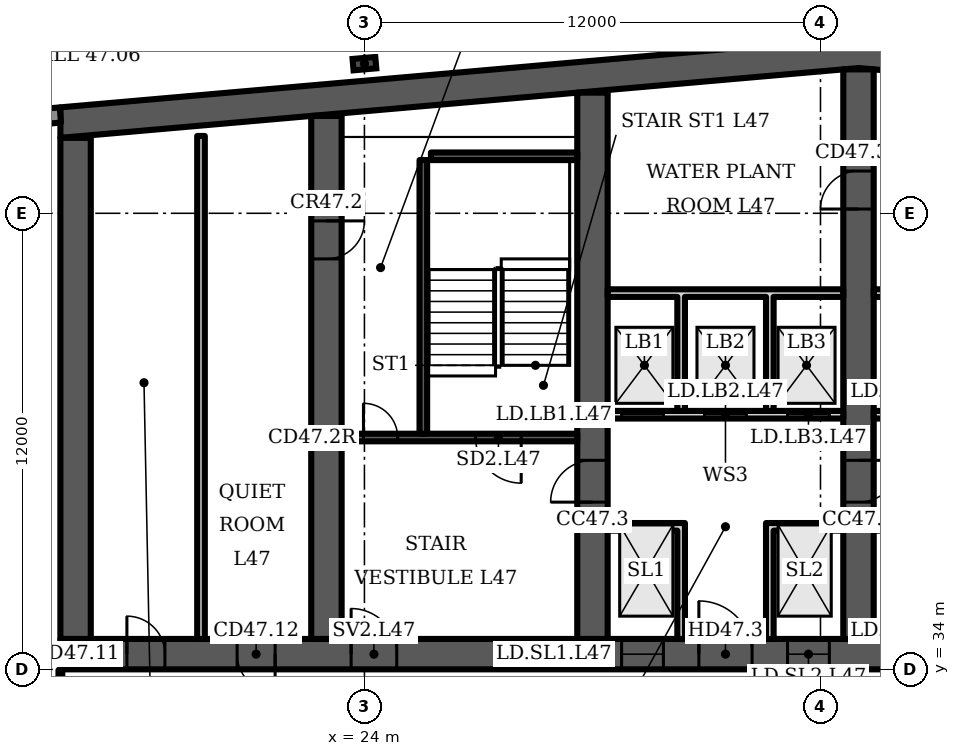
"""IFC4 building model, lengths in metres.
Left out: names, types, materials, properties, quantities, classifications, styles, units other than length and angle.
Written with IfcOpenShell. Run it as: python <this file> out.ifc"""

import sys

from ifc_helpers import new_model, si_unit, direction, frame, frame_2d, origin, origin_2d, place, context, subcontext, project, spatial, polyline, rectangle, i_section, outline, extrude, element, fill, save


model = new_model("IFC4")
c1 = context("Model", 3, precision=1e-05, world=origin(), true_north=direction((0.0, 1.0)))
c2 = subcontext(c1, "Body", "Model", "MODEL_VIEW")
j1 = project(units=[si_unit("LENGTHUNIT", "METRE"), si_unit("PLANEANGLEUNIT", "RADIAN")], contexts=[c1])
p1 = place(None, origin())
s1 = spatial("IfcSite", under=j1, at=p1, CompositionType="ELEMENT")
p2 = place(p1, origin())
s2 = spatial("IfcBuilding", under=s1, at=p2, CompositionType="ELEMENT")
p3 = place(p2, frame((0.0, 0.0, 191.5)))
s3 = spatial("IfcBuildingStorey", under=s2, at=p3, CompositionType="ELEMENT", Elevation=191.5)
p4 = place(p3, origin())
e1 = element("IfcWall", 1, at=p4, inside=s3, PredefinedType="SHEAR", context=c2, shape_type="SweptSolid", body=[
    extrude(outline(polyline([(16.0, 47.984), (37.0, 49.822), (58.0, 47.984), (58.0, 48.787), (37.0, 50.625), (16.0, 48.787), (16.0, 47.984)])), origin(), (0.0, 0.0, 1.0), 3.6),
])
p5 = place(p3, frame((16.0, 34.4, 0.0), z_axis=(0.0, 0.0, 1.0), x_axis=(1.0, 0.0, 0.0)))
e2 = element("IfcWall", 2, at=p5, inside=s3, PredefinedType="SHEAR", context=c2, shape_type="SweptSolid", body=[
    extrude(rectangle(XDim=42.0, YDim=0.8, at=frame_2d((21.0, 0.0))), origin(), (0.0, 0.0, 1.0), 3.6),
])
p6 = place(p5, frame((1.75, 0.0, 0.0)))
e3 = element("IfcOpeningElement", 3, at=p6, cuts=e2, PredefinedType="OPENING", context=c2, shape_type="SweptSolid", body=[
    extrude(rectangle(XDim=1.0, YDim=2.1, at=frame_2d((0.5, 1.05))), frame((0.0, 0.41, 0.0), z_axis=(0.0, -1.0, 0.0), x_axis=(1.0, 0.0, 0.0)), (0.0, 0.0, 1.0), 0.82),
])
p7 = place(p5, frame((4.65, 0.0, 0.0)))
e4 = element("IfcOpeningElement", 4, at=p7, cuts=e2, PredefinedType="OPENING", context=c2, shape_type="SweptSolid", body=[
    extrude(rectangle(XDim=1.0, YDim=2.1, at=frame_2d((0.5, 1.05))), frame((0.0, 0.41, 0.0), z_axis=(0.0, -1.0, 0.0), x_axis=(1.0, 0.0, 0.0)), (0.0, 0.0, 1.0), 0.82),
])
p8 = place(p5, frame((7.65, 0.0, 0.0)))
e5 = element("IfcOpeningElement", 5, at=p8, cuts=e2, PredefinedType="OPENING", context=c2, shape_type="SweptSolid", body=[
    extrude(rectangle(XDim=1.2, YDim=2.1, at=frame_2d((0.6, 1.05))), frame((0.0, 0.41, 0.0), z_axis=(0.0, -1.0, 0.0), x_axis=(1.0, 0.0, 0.0)), (0.0, 0.0, 1.0), 0.82),
])
p9 = place(p5, frame((14.767, 0.0, 0.0)))
e6 = element("IfcOpeningElement", 6, at=p9, cuts=e2, PredefinedType="OPENING", context=c2, shape_type="SweptSolid", body=[
    extrude(rectangle(XDim=1.1, YDim=2.1, at=frame_2d((0.55, 1.05))), frame((0.0, 0.41, 0.0), z_axis=(0.0, -1.0, 0.0), x_axis=(1.0, 0.0, 0.0)), (0.0, 0.0, 1.0), 0.82),
])
p10 = place(p5, frame((19.133, 0.0, 0.0)))
e7 = element("IfcOpeningElement", 7, at=p10, cuts=e2, PredefinedType="OPENING", context=c2, shape_type="SweptSolid", body=[
    extrude(rectangle(XDim=1.1, YDim=2.1, at=frame_2d((0.55, 1.05))), frame((0.0, 0.41, 0.0), z_axis=(0.0, -1.0, 0.0), x_axis=(1.0, 0.0, 0.0)), (0.0, 0.0, 1.0), 0.82),
])
p11 = place(p5, frame((16.8, 0.0, 0.0)))
e8 = element("IfcOpeningElement", 8, at=p11, cuts=e2, PredefinedType="OPENING", context=c2, shape_type="SweptSolid", body=[
    extrude(rectangle(XDim=1.4, YDim=2.1, at=frame_2d((0.7, 1.05))), frame((0.0, 0.41, 0.0), z_axis=(0.0, -1.0, 0.0), x_axis=(1.0, 0.0, 0.0)), (0.0, 0.0, 1.0), 0.82),
])
p12 = place(p5, frame((21.767, 0.0, 0.0)))
e9 = element("IfcOpeningElement", 9, at=p12, cuts=e2, PredefinedType="OPENING", context=c2, shape_type="SweptSolid", body=[
    extrude(rectangle(XDim=1.1, YDim=2.1, at=frame_2d((0.55, 1.05))), frame((0.0, 0.41, 0.0), z_axis=(0.0, -1.0, 0.0), x_axis=(1.0, 0.0, 0.0)), (0.0, 0.0, 1.0), 0.82),
])
p13 = place(p5, frame((23.95, 0.0, 0.0)))
e10 = element("IfcOpeningElement", 10, at=p13, cuts=e2, PredefinedType="OPENING", context=c2, shape_type="SweptSolid", body=[
    extrude(rectangle(XDim=1.1, YDim=2.1, at=frame_2d((0.55, 1.05))), frame((0.0, 0.41, 0.0), z_axis=(0.0, -1.0, 0.0), x_axis=(1.0, 0.0, 0.0)), (0.0, 0.0, 1.0), 0.82),
])
p14 = place(p5, frame((26.133, 0.0, 0.0)))
e11 = element("IfcOpeningElement", 11, at=p14, cuts=e2, PredefinedType="OPENING", context=c2, shape_type="SweptSolid", body=[
    extrude(rectangle(XDim=1.1, YDim=2.1, at=frame_2d((0.55, 1.05))), frame((0.0, 0.41, 0.0), z_axis=(0.0, -1.0, 0.0), x_axis=(1.0, 0.0, 0.0)), (0.0, 0.0, 1.0), 0.82),
])
p15 = place(p5, frame((33.15, 0.0, 0.0)))
e12 = element("IfcOpeningElement", 12, at=p15, cuts=e2, PredefinedType="OPENING", context=c2, shape_type="SweptSolid", body=[
    extrude(rectangle(XDim=1.2, YDim=2.1, at=frame_2d((0.6, 1.05))), frame((0.0, 0.41, 0.0), z_axis=(0.0, -1.0, 0.0), x_axis=(1.0, 0.0, 0.0)), (0.0, 0.0, 1.0), 0.82),
])
p16 = place(p5, frame((37.767, 0.0, 0.0)))
e13 = element("IfcOpeningElement", 13, at=p16, cuts=e2, PredefinedType="OPENING", context=c2, shape_type="SweptSolid", body=[
    extrude(rectangle(XDim=1.4, YDim=2.1, at=frame_2d((0.7, 1.05))), frame((0.0, 0.41, 0.0), z_axis=(0.0, -1.0, 0.0), x_axis=(1.0, 0.0, 0.0)), (0.0, 0.0, 1.0), 0.82),
])
p17 = place(p3, frame((16.4, 34.8, 0.0), z_axis=(0.0, 0.0, 1.0), x_axis=(0.0, 1.0, 0.0)))
e14 = element("IfcWall", 14, at=p17, inside=s3, PredefinedType="SHEAR", context=c2, shape_type="SweptSolid", body=[
    extrude(rectangle(XDim=13.184, YDim=0.8, at=frame_2d((6.592, 0.0))), origin(), (0.0, 0.0, 1.0), 3.6),
])
p18 = place(p3, frame((23.0, 34.8, 0.0), z_axis=(0.0, 0.0, 1.0), x_axis=(0.0, 1.0, 0.0)))
e15 = element("IfcWall", 15, at=p18, inside=s3, PredefinedType="SHEAR", context=c2, shape_type="SweptSolid", body=[
    extrude(rectangle(XDim=13.762, YDim=0.8, at=frame_2d((6.881, 0.0))), origin(), (0.0, 0.0, 1.0), 3.6),
])
p19 = place(p18, frame((10.0, 0.0, 0.0)))
e16 = element("IfcOpeningElement", 16, at=p19, cuts=e15, PredefinedType="OPENING", context=c2, shape_type="SweptSolid", body=[
    extrude(rectangle(XDim=1.0, YDim=2.1, at=frame_2d((0.5, 1.05))), frame((0.0, 0.41, 0.0), z_axis=(0.0, -1.0, 0.0), x_axis=(1.0, 0.0, 0.0)), (0.0, 0.0, 1.0), 0.82),
])
p20 = place(p3, frame((30.0, 34.8, 0.0), z_axis=(0.0, 0.0, 1.0), x_axis=(0.0, 1.0, 0.0)))
e17 = element("IfcWall", 17, at=p20, inside=s3, PredefinedType="SHEAR", context=c2, shape_type="SweptSolid", body=[
    extrude(rectangle(XDim=14.374, YDim=0.8, at=frame_2d((7.187, 0.0))), origin(), (0.0, 0.0, 1.0), 3.6),
])
p21 = place(p20, frame((3.6, 0.0, 0.0)))
e18 = element("IfcOpeningElement", 18, at=p21, cuts=e17, PredefinedType="OPENING", context=c2, shape_type="SweptSolid", body=[
    extrude(rectangle(XDim=1.1, YDim=2.1, at=frame_2d((0.55, 1.05))), frame((0.0, 0.41, 0.0), z_axis=(0.0, -1.0, 0.0), x_axis=(1.0, 0.0, 0.0)), (0.0, 0.0, 1.0), 0.82),
])
p22 = place(p3, frame((37.0, 34.8, 0.0), z_axis=(0.0, 0.0, 1.0), x_axis=(0.0, 1.0, 0.0)))
e19 = element("IfcWall", 19, at=p22, inside=s3, PredefinedType="SHEAR", context=c2, shape_type="SweptSolid", body=[
    extrude(rectangle(XDim=14.987, YDim=0.8, at=frame_2d((7.493, 0.0))), origin(), (0.0, 0.0, 1.0), 3.6),
])
p23 = place(p22, frame((11.312, 0.0, 0.0)))
e20 = element("IfcOpeningElement", 20, at=p23, cuts=e19, PredefinedType="OPENING", context=c2, shape_type="SweptSolid", body=[
    extrude(rectangle(XDim=1.0, YDim=2.1, at=frame_2d((0.5, 1.05))), frame((0.0, 0.41, 0.0), z_axis=(0.0, -1.0, 0.0), x_axis=(1.0, 0.0, 0.0)), (0.0, 0.0, 1.0), 0.82),
])
p24 = place(p22, frame((3.6, 0.0, 0.0)))
e21 = element("IfcOpeningElement", 21, at=p24, cuts=e19, PredefinedType="OPENING", context=c2, shape_type="SweptSolid", body=[
    extrude(rectangle(XDim=1.1, YDim=2.1, at=frame_2d((0.55, 1.05))), frame((0.0, 0.41, 0.0), z_axis=(0.0, -1.0, 0.0), x_axis=(1.0, 0.0, 0.0)), (0.0, 0.0, 1.0), 0.82),
])
p25 = place(p3, frame((24.0, 49.937, 0.0), z_axis=(0.0, 0.0, 1.0), x_axis=(-0.087156, 0.996198, 0.0)))
e22 = element("IfcColumn", 22, at=p25, inside=s3, PredefinedType="COLUMN", context=c2, shape_type="SweptSolid", body=[
    extrude(i_section(OverallWidth=0.3, OverallDepth=0.6, WebThickness=0.015, FlangeThickness=0.03, FilletRadius=0.027, at=origin_2d()), origin(), (0.0, 0.0, 1.0), 3.6),
])
p26 = place(p3, frame((16.0, 48.587, 0.0), z_axis=(0.0, 0.0, 1.0), x_axis=(-0.996194, -0.087168, 0.0)))
e23 = element("IfcWall", 23, at=p26, inside=s3, PredefinedType="SOLIDWALL", context=c2, shape_type="SweptSolid", body=[
    extrude(rectangle(XDim=2.994, YDim=0.4, at=frame_2d((1.497, 0.0))), origin(), (0.0, 0.0, 1.0), 3.2),
])
p27 = place(p3, frame((19.7, 34.8, 0.0), z_axis=(0.0, 0.0, 1.0), x_axis=(0.0, 1.0, 0.0)))
e24 = element("IfcWall", 24, at=p27, inside=s3, PredefinedType="PARTITIONING", context=c2, shape_type="SweptSolid", body=[
    extrude(rectangle(XDim=13.234, YDim=0.2, at=frame_2d((6.617, 0.0))), origin(), (0.0, 0.0, 1.0), 3.2),
])
p28 = place(p3, frame((23.4, 40.1, 0.0), z_axis=(0.0, 0.0, 1.0), x_axis=(1.0, 0.0, 0.0)))
e25 = element("IfcWall", 25, at=p28, inside=s3, PredefinedType="SHEAR", context=c2, shape_type="SweptSolid", body=[
    extrude(rectangle(XDim=6.2, YDim=0.2, at=frame_2d((3.1, 0.0))), origin(), (0.0, 0.0, 1.0), 3.2),
])
p29 = place(p28, frame((3.525, 0.0, 0.0)))
e26 = element("IfcOpeningElement", 26, at=p29, cuts=e25, PredefinedType="OPENING", context=c2, shape_type="SweptSolid", body=[
    extrude(rectangle(XDim=1.2, YDim=2.1, at=frame_2d((0.6, 1.05))), frame((0.0, 0.11, 0.0), z_axis=(0.0, -1.0, 0.0), x_axis=(1.0, 0.0, 0.0)), (0.0, 0.0, 1.0), 0.22),
])
p30 = place(p28, frame((0.575, 0.0, 0.0)))
e27 = element("IfcOpeningElement", 27, at=p30, cuts=e25, PredefinedType="OPENING", context=c2, shape_type="SweptSolid", body=[
    extrude(rectangle(XDim=0.9, YDim=2.1, at=frame_2d((0.45, 1.05))), frame((0.0, 0.11, 0.0), z_axis=(0.0, -1.0, 0.0), x_axis=(1.0, 0.0, 0.0)), (0.0, 0.0, 1.0), 0.22),
])
p31 = place(p3, frame((25.55, 40.2, 0.0), z_axis=(0.0, 0.0, 1.0), x_axis=(0.0, 1.0, 0.0)))
e28 = element("IfcWall", 28, at=p31, inside=s3, PredefinedType="SHEAR", context=c2, shape_type="SweptSolid", body=[
    extrude(rectangle(XDim=7.2, YDim=0.2, at=frame_2d((3.6, 0.0))), origin(), (0.0, 0.0, 1.0), 3.2),
])
p32 = place(p3, frame((25.75, 47.5, 0.0), z_axis=(0.0, 0.0, 1.0), x_axis=(1.0, 0.0, 0.0)))
e29 = element("IfcWall", 29, at=p32, inside=s3, PredefinedType="SHEAR", context=c2, shape_type="SweptSolid", body=[
    extrude(rectangle(XDim=3.85, YDim=0.2, at=frame_2d((1.925, 0.0))), origin(), (0.0, 0.0, 1.0), 3.2),
])
p33 = place(p3, frame((30.4, 40.7, 0.0), z_axis=(0.0, 0.0, 1.0), x_axis=(1.0, 0.0, 0.0)))
e30 = element("IfcWall", 30, at=p33, inside=s3, PredefinedType="PARTITIONING", context=c2, shape_type="SweptSolid", body=[
    extrude(rectangle(XDim=6.2, YDim=0.2, at=frame_2d((3.1, 0.0))), origin(), (0.0, 0.0, 1.0), 3.2),
])
p34 = place(p33, frame((0.367, 0.0, 0.0)))
e31 = element("IfcOpeningElement", 31, at=p34, cuts=e30, PredefinedType="OPENING", context=c2, shape_type="SweptSolid", body=[
    extrude(rectangle(XDim=1.1, YDim=2.1, at=frame_2d((0.55, 1.05))), frame((0.0, 0.11, 0.0), z_axis=(0.0, -1.0, 0.0), x_axis=(1.0, 0.0, 0.0)), (0.0, 0.0, 1.0), 0.22),
])
p35 = place(p33, frame((2.55, 0.0, 0.0)))
e32 = element("IfcOpeningElement", 32, at=p35, cuts=e30, PredefinedType="OPENING", context=c2, shape_type="SweptSolid", body=[
    extrude(rectangle(XDim=1.1, YDim=2.1, at=frame_2d((0.55, 1.05))), frame((0.0, 0.11, 0.0), z_axis=(0.0, -1.0, 0.0), x_axis=(1.0, 0.0, 0.0)), (0.0, 0.0, 1.0), 0.22),
])
p36 = place(p33, frame((4.733, 0.0, 0.0)))
e33 = element("IfcOpeningElement", 33, at=p36, cuts=e30, PredefinedType="OPENING", context=c2, shape_type="SweptSolid", body=[
    extrude(rectangle(XDim=1.1, YDim=2.1, at=frame_2d((0.55, 1.05))), frame((0.0, 0.11, 0.0), z_axis=(0.0, -1.0, 0.0), x_axis=(1.0, 0.0, 0.0)), (0.0, 0.0, 1.0), 0.22),
])
p37 = place(p3, frame((0.0, 0.0, -0.0)))
e34 = element("IfcWall", 34, at=p37, inside=s3, PredefinedType="PARTITIONING", context=c2, shape_type="SweptSolid", body=[
    extrude(outline(polyline([(32.233, 37.65), (30.4, 37.65), (30.4, 37.85), (32.233, 37.85), (32.433, 37.85), (32.433, 34.8), (32.233, 34.8), (32.233, 37.65)])), origin(), (0.0, 0.0, 1.0), 3.2),
])
p38 = place(p3, frame((0.0, 0.0, -0.0)))
e35 = element("IfcWall", 35, at=p38, inside=s3, PredefinedType="PARTITIONING", context=c2, shape_type="SweptSolid", body=[
    extrude(outline(polyline([(34.567, 37.85), (34.767, 37.85), (36.6, 37.85), (36.6, 37.65), (34.767, 37.65), (34.767, 34.8), (34.567, 34.8), (34.567, 37.85)])), origin(), (0.0, 0.0, 1.0), 3.2),
])
p39 = place(p3, frame((0.0, 0.0, -0.0)))
e36 = element("IfcWall", 36, at=p39, inside=s3, PredefinedType="PARTITIONING", context=c2, shape_type="SweptSolid", body=[
    extrude(outline(polyline([(32.433, 40.8), (32.233, 40.8), (32.233, 43.8), (30.4, 43.8), (30.4, 44.0), (36.6, 44.0), (36.6, 43.8), (34.767, 43.8), (34.767, 40.8), (34.567, 40.8), (34.567, 43.8), (32.433, 43.8), (32.433, 40.8)])), origin(), (0.0, 0.0, 1.0), 3.2),
])
p40 = place(p3, frame((37.4, 40.7, 0.0), z_axis=(0.0, 0.0, 1.0), x_axis=(1.0, 0.0, 0.0)))
e37 = element("IfcWall", 37, at=p40, inside=s3, PredefinedType="PARTITIONING", context=c2, shape_type="SweptSolid", body=[
    extrude(rectangle(XDim=6.2, YDim=0.2, at=frame_2d((3.1, 0.0))), origin(), (0.0, 0.0, 1.0), 3.2),
])
p41 = place(p40, frame((0.367, 0.0, 0.0)))
e38 = element("IfcOpeningElement", 38, at=p41, cuts=e37, PredefinedType="OPENING", context=c2, shape_type="SweptSolid", body=[
    extrude(rectangle(XDim=1.1, YDim=2.1, at=frame_2d((0.55, 1.05))), frame((0.0, 0.11, 0.0), z_axis=(0.0, -1.0, 0.0), x_axis=(1.0, 0.0, 0.0)), (0.0, 0.0, 1.0), 0.22),
])
p42 = place(p40, frame((2.55, 0.0, 0.0)))
e39 = element("IfcOpeningElement", 39, at=p42, cuts=e37, PredefinedType="OPENING", context=c2, shape_type="SweptSolid", body=[
    extrude(rectangle(XDim=1.1, YDim=2.1, at=frame_2d((0.55, 1.05))), frame((0.0, 0.11, 0.0), z_axis=(0.0, -1.0, 0.0), x_axis=(1.0, 0.0, 0.0)), (0.0, 0.0, 1.0), 0.22),
])
p43 = place(p40, frame((4.733, 0.0, 0.0)))
e40 = element("IfcOpeningElement", 40, at=p43, cuts=e37, PredefinedType="OPENING", context=c2, shape_type="SweptSolid", body=[
    extrude(rectangle(XDim=1.1, YDim=2.1, at=frame_2d((0.55, 1.05))), frame((0.0, 0.11, 0.0), z_axis=(0.0, -1.0, 0.0), x_axis=(1.0, 0.0, 0.0)), (0.0, 0.0, 1.0), 0.22),
])
p44 = place(p3, frame((0.0, 0.0, -0.0)))
e41 = element("IfcWall", 41, at=p44, inside=s3, PredefinedType="PARTITIONING", context=c2, shape_type="SweptSolid", body=[
    extrude(outline(polyline([(41.567, 37.1), (39.433, 37.1), (39.433, 34.8), (39.233, 34.8), (39.233, 37.65), (37.4, 37.65), (37.4, 37.85), (39.233, 37.85), (39.433, 37.85), (39.433, 37.3), (41.567, 37.3), (41.567, 37.55), (41.767, 37.55), (43.6, 37.55), (43.6, 37.35), (41.767, 37.35), (41.767, 34.8), (41.567, 34.8), (41.567, 37.1)])), origin(), (0.0, 0.0, 1.0), 3.2),
])
p45 = place(p3, frame((0.0, 0.0, -0.0)))
e42 = element("IfcWall", 42, at=p45, inside=s3, PredefinedType="PARTITIONING", context=c2, shape_type="SweptSolid", body=[
    extrude(outline(polyline([(39.433, 40.8), (39.233, 40.8), (39.233, 43.8), (37.4, 43.8), (37.4, 44.0), (43.6, 44.0), (43.6, 43.8), (41.767, 43.8), (41.767, 40.8), (41.567, 40.8), (41.567, 43.8), (39.433, 43.8), (39.433, 40.8)])), origin(), (0.0, 0.0, 1.0), 3.2),
])
p46 = place(p3, frame((37.0, 30.5, 0.0), z_axis=(0.0, 0.0, 1.0), x_axis=(0.0, 1.0, 0.0)))
e43 = element("IfcWall", 43, at=p46, inside=s3, PredefinedType="PARTITIONING", context=c2, shape_type="SweptSolid", body=[
    extrude(rectangle(XDim=3.5, YDim=0.2, at=frame_2d((1.75, 0.0))), origin(), (0.0, 0.0, 1.0), 3.2),
])
p47 = place(p46, frame((1.2, 0.0, 0.0)))
e44 = element("IfcOpeningElement", 44, at=p47, cuts=e43, PredefinedType="OPENING", context=c2, shape_type="SweptSolid", body=[
    extrude(rectangle(XDim=1.1, YDim=2.1, at=frame_2d((0.55, 1.05))), frame((0.0, 0.11, 0.0), z_axis=(0.0, -1.0, 0.0), x_axis=(1.0, 0.0, 0.0)), (0.0, 0.0, 1.0), 0.22),
])
p48 = place(p3, frame((16.0, 30.5, 0.0), z_axis=(0.0, 0.0, 1.0), x_axis=(0.0, 1.0, 0.0)))
e45 = element("IfcWall", 45, at=p48, inside=s3, PredefinedType="PARTITIONING", context=c2, shape_type="SweptSolid", body=[
    extrude(rectangle(XDim=3.48, YDim=0.1, at=frame_2d((1.74, 0.0))), origin(), (0.0, 0.0, 1.0), 3.2),
])
p49 = place(p48, frame((0.08, 0.0, 0.0)))
e46 = element("IfcOpeningElement", 46, at=p49, cuts=e45, PredefinedType="OPENING", context=c2, shape_type="SweptSolid", body=[
    extrude(rectangle(XDim=1.0, YDim=2.1, at=frame_2d((0.5, 1.05))), frame((0.0, 0.06, 0.0), z_axis=(0.0, -1.0, 0.0), x_axis=(1.0, 0.0, 0.0)), (0.0, 0.0, 1.0), 0.12),
])
p50 = place(p6, origin())
e47 = element("IfcDoor", 47, at=p50, inside=s3, OperationType="SINGLE_SWING_LEFT", PredefinedType="DOOR", context=c2, shape_type="SweptSolid", body=[
    extrude(rectangle(XDim=1.0, YDim=2.1, at=frame_2d((0.5, 1.05))), frame((0.0, 0.4, 0.0), z_axis=(0.0, -1.0, 0.0), x_axis=(1.0, 0.0, 0.0)), (0.0, 0.0, 1.0), 0.8),
])
fill(e3, e47)
p51 = place(p7, origin())
e48 = element("IfcDoor", 48, at=p51, inside=s3, OperationType="SINGLE_SWING_RIGHT", PredefinedType="DOOR", context=c2, shape_type="SweptSolid", body=[
    extrude(rectangle(XDim=1.0, YDim=2.1, at=frame_2d((0.5, 1.05))), frame((0.0, 0.4, 0.0), z_axis=(0.0, -1.0, 0.0), x_axis=(1.0, 0.0, 0.0)), (0.0, 0.0, 1.0), 0.8),
])
fill(e4, e48)
p52 = place(p29, origin())
e49 = element("IfcDoor", 49, at=p52, inside=s3, OperationType="SINGLE_SWING_RIGHT", PredefinedType="DOOR", context=c2, shape_type="SweptSolid", body=[
    extrude(rectangle(XDim=1.2, YDim=2.1, at=frame_2d((0.6, 1.05))), frame((0.0, 0.025, 0.0), z_axis=(0.0, -1.0, 0.0), x_axis=(1.0, 0.0, 0.0)), (0.0, 0.0, 1.0), 0.05),
])
fill(e26, e49)
p53 = place(p30, origin())
e50 = element("IfcDoor", 50, at=p53, inside=s3, OperationType="SINGLE_SWING_LEFT", PredefinedType="DOOR", context=c2, shape_type="SweptSolid", body=[
    extrude(rectangle(XDim=0.9, YDim=2.1, at=frame_2d((0.45, 1.05))), frame((0.0, 0.025, 0.0), z_axis=(0.0, -1.0, 0.0), x_axis=(1.0, 0.0, 0.0)), (0.0, 0.0, 1.0), 0.05),
])
fill(e27, e50)
p54 = place(p8, origin())
e51 = element("IfcDoor", 51, at=p54, inside=s3, OperationType="SINGLE_SWING_LEFT", PredefinedType="DOOR", context=c2, shape_type="SweptSolid", body=[
    extrude(rectangle(XDim=1.2, YDim=2.1, at=frame_2d((0.6, 1.05))), frame((0.0, 0.025, 0.0), z_axis=(0.0, -1.0, 0.0), x_axis=(1.0, 0.0, 0.0)), (0.0, 0.0, 1.0), 0.05),
])
fill(e5, e51)
p55 = place(p9, origin())
e52 = element("IfcDoor", 52, at=p55, inside=s3, OperationType="DOUBLE_DOOR_SLIDING", PredefinedType="DOOR", context=c2, shape_type="SweptSolid", body=[
    extrude(rectangle(XDim=1.1, YDim=2.1, at=frame_2d((0.55, 1.05))), frame((0.0, 0.025, 0.0), z_axis=(0.0, -1.0, 0.0), x_axis=(1.0, 0.0, 0.0)), (0.0, 0.0, 1.0), 0.05),
])
fill(e6, e52)
p56 = place(p10, origin())
e53 = element("IfcDoor", 53, at=p56, inside=s3, OperationType="DOUBLE_DOOR_SLIDING", PredefinedType="DOOR", context=c2, shape_type="SweptSolid", body=[
    extrude(rectangle(XDim=1.1, YDim=2.1, at=frame_2d((0.55, 1.05))), frame((0.0, 0.025, 0.0), z_axis=(0.0, -1.0, 0.0), x_axis=(1.0, 0.0, 0.0)), (0.0, 0.0, 1.0), 0.05),
])
fill(e7, e53)
p57 = place(p11, origin())
e54 = element("IfcDoor", 54, at=p57, inside=s3, OperationType="DOUBLE_DOOR_SINGLE_SWING", PredefinedType="DOOR", context=c2, shape_type="SweptSolid", body=[
    extrude(rectangle(XDim=1.4, YDim=2.1, at=frame_2d((0.7, 1.05))), frame((0.0, 0.025, 0.0), z_axis=(0.0, -1.0, 0.0), x_axis=(1.0, 0.0, 0.0)), (0.0, 0.0, 1.0), 0.05),
])
fill(e8, e54)
p58 = place(p34, origin())
e55 = element("IfcDoor", 55, at=p58, inside=s3, OperationType="DOUBLE_DOOR_SLIDING", PredefinedType="DOOR", context=c2, shape_type="SweptSolid", body=[
    extrude(rectangle(XDim=1.1, YDim=2.1, at=frame_2d((0.55, 1.05))), frame((0.0, 0.025, 0.0), z_axis=(0.0, -1.0, 0.0), x_axis=(1.0, 0.0, 0.0)), (0.0, 0.0, 1.0), 0.05),
])
fill(e31, e55)
p59 = place(p35, origin())
e56 = element("IfcDoor", 56, at=p59, inside=s3, OperationType="DOUBLE_DOOR_SLIDING", PredefinedType="DOOR", context=c2, shape_type="SweptSolid", body=[
    extrude(rectangle(XDim=1.1, YDim=2.1, at=frame_2d((0.55, 1.05))), frame((0.0, 0.025, 0.0), z_axis=(0.0, -1.0, 0.0), x_axis=(1.0, 0.0, 0.0)), (0.0, 0.0, 1.0), 0.05),
])
fill(e32, e56)
p60 = place(p36, origin())
e57 = element("IfcDoor", 57, at=p60, inside=s3, OperationType="DOUBLE_DOOR_SLIDING", PredefinedType="DOOR", context=c2, shape_type="SweptSolid", body=[
    extrude(rectangle(XDim=1.1, YDim=2.1, at=frame_2d((0.55, 1.05))), frame((0.0, 0.025, 0.0), z_axis=(0.0, -1.0, 0.0), x_axis=(1.0, 0.0, 0.0)), (0.0, 0.0, 1.0), 0.05),
])
fill(e33, e57)
p61 = place(p23, origin())
e58 = element("IfcDoor", 58, at=p61, inside=s3, OperationType="SINGLE_SWING_LEFT", PredefinedType="DOOR", context=c2, shape_type="SweptSolid", body=[
    extrude(rectangle(XDim=1.0, YDim=2.1, at=frame_2d((0.5, 1.05))), frame((0.0, 0.4, 0.0), z_axis=(0.0, -1.0, 0.0), x_axis=(1.0, 0.0, 0.0)), (0.0, 0.0, 1.0), 0.8),
])
fill(e20, e58)
p62 = place(p19, origin())
e59 = element("IfcDoor", 59, at=p62, inside=s3, OperationType="SINGLE_SWING_RIGHT", PredefinedType="DOOR", context=c2, shape_type="SweptSolid", body=[
    extrude(rectangle(XDim=1.0, YDim=2.1, at=frame_2d((0.5, 1.05))), frame((0.0, 0.4, 0.0), z_axis=(0.0, -1.0, 0.0), x_axis=(1.0, 0.0, 0.0)), (0.0, 0.0, 1.0), 0.8),
])
fill(e16, e59)
p63 = place(p21, origin())
e60 = element("IfcDoor", 60, at=p63, inside=s3, OperationType="SINGLE_SWING_LEFT", PredefinedType="DOOR", context=c2, shape_type="SweptSolid", body=[
    extrude(rectangle(XDim=1.1, YDim=2.1, at=frame_2d((0.55, 1.05))), frame((0.0, 0.025, 0.0), z_axis=(0.0, -1.0, 0.0), x_axis=(1.0, 0.0, 0.0)), (0.0, 0.0, 1.0), 0.05),
])
fill(e18, e60)
p64 = place(p24, origin())
e61 = element("IfcDoor", 61, at=p64, inside=s3, OperationType="SINGLE_SWING_RIGHT", PredefinedType="DOOR", context=c2, shape_type="SweptSolid", body=[
    extrude(rectangle(XDim=1.1, YDim=2.1, at=frame_2d((0.55, 1.05))), frame((0.0, 0.025, 0.0), z_axis=(0.0, -1.0, 0.0), x_axis=(1.0, 0.0, 0.0)), (0.0, 0.0, 1.0), 0.05),
])
fill(e21, e61)
save(model, sys.argv[1])
